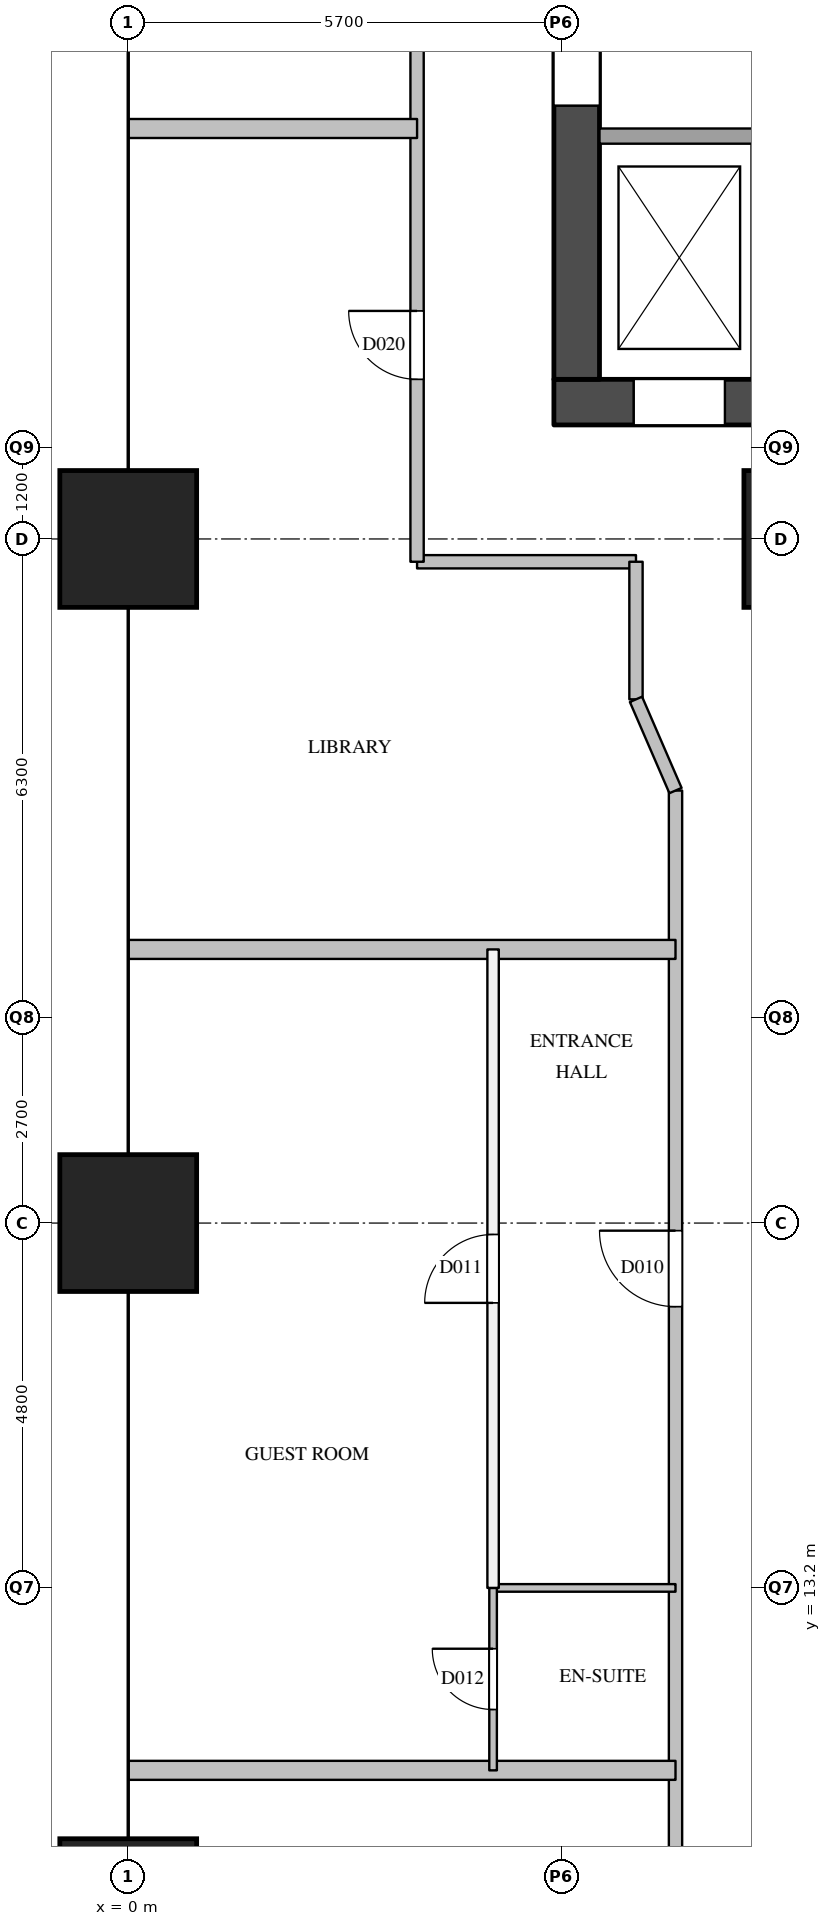
"""IFC4 building model, lengths in metres.
Left out: names, types, materials, properties, quantities, classifications, styles, units other than length and angle.
Written with IfcOpenShell. Run it as: python <this file> out.ifc"""

import sys

from ifc_helpers import new_model, si_unit, direction, frame, frame_2d, origin, origin_2d, place, context, subcontext, project, spatial, rectangle, extrude, element, fill, save


model = new_model("IFC4")
c1 = context("Model", 3, precision=1e-05, world=origin(), true_north=direction((0.0, 1.0)))
c2 = subcontext(c1, "Body", "Model", "MODEL_VIEW")
j1 = project(units=[si_unit("LENGTHUNIT", "METRE"), si_unit("PLANEANGLEUNIT", "RADIAN")], contexts=[c1])
p1 = place(None, origin())
s1 = spatial("IfcSite", under=j1, at=p1, CompositionType="ELEMENT")
p2 = place(p1, origin())
s2 = spatial("IfcBuilding", under=s1, at=p2, CompositionType="ELEMENT")
p3 = place(p2, frame((0.0, 0.0, 31.0)))
s3 = spatial("IfcBuildingStorey", under=s2, at=p3, CompositionType="ELEMENT", Elevation=31.0)
for number, where, z_axis, x_axis in (
    (1, (0.0, 9.0, 0.0), (0.0, 0.0, 1.0), (1.0, 0.0, 0.0)),
    (2, (0.0, 18.0, 0.0), (0.0, 0.0, 1.0), (1.0, 0.0, 0.0)),
    (3, (0.0, 27.0, 0.0), (0.0, 0.0, 1.0), (1.0, 0.0, 0.0)),
    (4, (9.0, 27.0, 0.0), (0.0, 0.0, 1.0), (1.0, 0.0, 0.0)),
):
    element("IfcColumn", number, at=place(p3, frame(where, z_axis=z_axis, x_axis=x_axis)), inside=s3, PredefinedType="COLUMN", context=c2, shape_type="SweptSolid", body=[
        extrude(rectangle(XDim=1.8, YDim=1.8, at=origin_2d()), origin(), (0.0, 0.0, 1.0), 3.8),
    ])
p4 = place(p3, frame((5.6, 28.8, 0.0), z_axis=(0.0, 0.0, 1.0), x_axis=(1.0, 0.0, 0.0)))
e5 = element("IfcWall", 5, at=p4, inside=s3, PredefinedType="SHEAR", context=c2, shape_type="SweptSolid", body=[
    extrude(rectangle(XDim=12.4, YDim=0.6, at=frame_2d((6.2, 0.0))), origin(), (0.0, 0.0, 1.0), 3.5),
])
p5 = place(p4, frame((1.05, 0.0, 0.0)))
e6 = element("IfcOpeningElement", 6, at=p5, cuts=e5, PredefinedType="OPENING", context=c2, shape_type="SweptSolid", body=[
    extrude(rectangle(XDim=1.2, YDim=2.1, at=frame_2d((0.6, 1.05))), frame((0.0, 0.31, 0.0), z_axis=(0.0, -1.0, 0.0), x_axis=(1.0, 0.0, 0.0)), (0.0, 0.0, 1.0), 0.62),
])
p6 = place(p4, frame((5.25, 0.0, 0.0)))
e7 = element("IfcOpeningElement", 7, at=p6, cuts=e5, PredefinedType="OPENING", context=c2, shape_type="SweptSolid", body=[
    extrude(rectangle(XDim=1.2, YDim=2.1, at=frame_2d((0.6, 1.05))), frame((0.0, 0.31, 0.0), z_axis=(0.0, -1.0, 0.0), x_axis=(1.0, 0.0, 0.0)), (0.0, 0.0, 1.0), 0.62),
])
p7 = place(p4, frame((7.35, 0.0, 0.0)))
e8 = element("IfcOpeningElement", 8, at=p7, cuts=e5, PredefinedType="OPENING", context=c2, shape_type="SweptSolid", body=[
    extrude(rectangle(XDim=1.2, YDim=2.1, at=frame_2d((0.6, 1.05))), frame((0.0, 0.31, 0.0), z_axis=(0.0, -1.0, 0.0), x_axis=(1.0, 0.0, 0.0)), (0.0, 0.0, 1.0), 0.62),
])
p8 = place(p3, frame((5.9, 29.1, 0.0), z_axis=(0.0, 0.0, 1.0), x_axis=(0.0, 1.0, 0.0)))
e9 = element("IfcWall", 9, at=p8, inside=s3, PredefinedType="SHEAR", context=c2, shape_type="SweptSolid", body=[
    extrude(rectangle(XDim=20.3, YDim=0.6, at=frame_2d((10.15, 0.0))), origin(), (0.0, 0.0, 1.0), 3.5),
])
p9 = place(p8, frame((3.6, 0.0, 0.0)))
e10 = element("IfcOpeningElement", 10, at=p9, cuts=e9, PredefinedType="OPENING", context=c2, shape_type="SweptSolid", body=[
    extrude(rectangle(XDim=1.8, YDim=2.1, at=frame_2d((0.9, 1.05))), frame((0.0, 0.31, 0.0), z_axis=(0.0, -1.0, 0.0), x_axis=(1.0, 0.0, 0.0)), (0.0, 0.0, 1.0), 0.62),
])
p10 = place(p8, frame((16.4, 0.0, 0.0)))
e11 = element("IfcOpeningElement", 11, at=p10, cuts=e9, PredefinedType="OPENING", context=c2, shape_type="SweptSolid", body=[
    extrude(rectangle(XDim=1.0, YDim=2.1, at=frame_2d((0.5, 1.05))), frame((0.0, 0.31, 0.0), z_axis=(0.0, -1.0, 0.0), x_axis=(1.0, 0.0, 0.0)), (0.0, 0.0, 1.0), 0.62),
])
p11 = place(p3, frame((6.2, 32.3, 0.0), z_axis=(0.0, 0.0, 1.0), x_axis=(1.0, 0.0, 0.0)))
e12 = element("IfcWall", 12, at=p11, inside=s3, PredefinedType="SOLIDWALL", context=c2, shape_type="SweptSolid", body=[
    extrude(rectangle(XDim=11.2, YDim=0.2, at=frame_2d((5.6, 0.0))), origin(), (0.0, 0.0, 1.0), 3.5),
])
p12 = place(p11, frame((2.55, 0.0, 0.0)))
e13 = element("IfcOpeningElement", 13, at=p12, cuts=e12, PredefinedType="OPENING", context=c2, shape_type="SweptSolid", body=[
    extrude(rectangle(XDim=1.2, YDim=2.1, at=frame_2d((0.6, 1.05))), frame((0.0, 0.11, 0.0), z_axis=(0.0, -1.0, 0.0), x_axis=(1.0, 0.0, 0.0)), (0.0, 0.0, 1.0), 0.22),
])
p13 = place(p3, frame((3.8, 26.7, 0.0), z_axis=(0.0, 0.0, 1.0), x_axis=(1.0, 0.0, 0.0)))
e14 = element("IfcWall", 14, at=p13, inside=s3, PredefinedType="PARTITIONING", context=c2, shape_type="SweptSolid", body=[
    extrude(rectangle(XDim=2.88, YDim=0.175, at=frame_2d((1.44, 0.0))), origin(), (0.0, 0.0, 1.0), 2.5),
])
p14 = place(p3, frame((3.8, 26.7, 0.0), z_axis=(0.0, 0.0, 1.0), x_axis=(0.0, 1.0, 0.0)))
e15 = element("IfcWall", 15, at=p14, inside=s3, PredefinedType="PARTITIONING", context=c2, shape_type="SweptSolid", body=[
    extrude(rectangle(XDim=25.1, YDim=0.175, at=frame_2d((12.55, 0.0))), origin(), (0.0, 0.0, 1.0), 2.5),
])
p15 = place(p14, frame((2.4, 0.0, 0.0)))
e16 = element("IfcOpeningElement", 16, at=p15, cuts=e15, PredefinedType="OPENING", context=c2, shape_type="SweptSolid", body=[
    extrude(rectangle(XDim=0.9, YDim=2.1, at=frame_2d((0.45, 1.05))), frame((0.0, 0.097, 0.0), z_axis=(0.0, -1.0, 0.0), x_axis=(1.0, 0.0, 0.0)), (0.0, 0.0, 1.0), 0.195),
])
p16 = place(p14, frame((7.95, 0.0, 0.0)))
e17 = element("IfcOpeningElement", 17, at=p16, cuts=e15, PredefinedType="OPENING", context=c2, shape_type="SweptSolid", body=[
    extrude(rectangle(XDim=0.9, YDim=2.1, at=frame_2d((0.45, 1.05))), frame((0.0, 0.097, 0.0), z_axis=(0.0, -1.0, 0.0), x_axis=(1.0, 0.0, 0.0)), (0.0, 0.0, 1.0), 0.195),
])
p17 = place(p14, frame((13.35, 0.0, 0.0)))
e18 = element("IfcOpeningElement", 18, at=p17, cuts=e15, PredefinedType="OPENING", context=c2, shape_type="SweptSolid", body=[
    extrude(rectangle(XDim=0.9, YDim=2.1, at=frame_2d((0.45, 1.05))), frame((0.0, 0.097, 0.0), z_axis=(0.0, -1.0, 0.0), x_axis=(1.0, 0.0, 0.0)), (0.0, 0.0, 1.0), 0.195),
])
p18 = place(p14, frame((20.35, 0.0, 0.0)))
e19 = element("IfcOpeningElement", 19, at=p18, cuts=e15, PredefinedType="OPENING", context=c2, shape_type="SweptSolid", body=[
    extrude(rectangle(XDim=0.9, YDim=2.1, at=frame_2d((0.45, 1.05))), frame((0.0, 0.097, 0.0), z_axis=(0.0, -1.0, 0.0), x_axis=(1.0, 0.0, 0.0)), (0.0, 0.0, 1.0), 0.195),
])
p19 = place(p3, frame((6.68, 24.89, 0.0), z_axis=(0.0, 0.0, 1.0), x_axis=(0.0, 1.0, 0.0)))
e20 = element("IfcWall", 20, at=p19, inside=s3, PredefinedType="PARTITIONING", context=c2, shape_type="SweptSolid", body=[
    extrude(rectangle(XDim=1.81, YDim=0.175, at=frame_2d((0.905, 0.0))), origin(), (0.0, 0.0, 1.0), 2.5),
])
p20 = place(p3, frame((7.2, 7.2, 0.0), z_axis=(0.0, 0.0, 1.0), x_axis=(0.0, 1.0, 0.0)))
e21 = element("IfcWall", 21, at=p20, inside=s3, PredefinedType="PARTITIONING", context=c2, shape_type="SweptSolid", body=[
    extrude(rectangle(XDim=16.49, YDim=0.175, at=frame_2d((8.245, 0.0))), origin(), (0.0, 0.0, 1.0), 3.5),
])
p21 = place(p20, frame((9.7, 0.0, 0.0)))
e22 = element("IfcOpeningElement", 22, at=p21, cuts=e21, PredefinedType="OPENING", context=c2, shape_type="SweptSolid", body=[
    extrude(rectangle(XDim=1.0, YDim=2.1, at=frame_2d((0.5, 1.05))), frame((0.0, 0.097, 0.0), z_axis=(0.0, -1.0, 0.0), x_axis=(1.0, 0.0, 0.0)), (0.0, 0.0, 1.0), 0.195),
])
p22 = place(p3, frame((4.8, 13.2, 0.0), z_axis=(0.0, 0.0, 1.0), x_axis=(0.0, 1.0, 0.0)))
e23 = element("IfcWall", 23, at=p22, inside=s3, PredefinedType="PARTITIONING", context=c2, shape_type="SweptSolid", body=[
    extrude(rectangle(XDim=8.4, YDim=0.15, at=frame_2d((4.2, 0.0))), origin(), (0.0, 0.0, 1.0), 3.5),
])
p23 = place(p22, frame((3.75, 0.0, 0.0)))
e24 = element("IfcOpeningElement", 24, at=p23, cuts=e23, PredefinedType="OPENING", context=c2, shape_type="SweptSolid", body=[
    extrude(rectangle(XDim=0.9, YDim=2.1, at=frame_2d((0.45, 1.05))), frame((0.0, 0.085, 0.0), z_axis=(0.0, -1.0, 0.0), x_axis=(1.0, 0.0, 0.0)), (0.0, 0.0, 1.0), 0.17),
])
for number, where, z_axis, x_axis in (
    (25, (0.0, 10.8, 0.0), (0.0, 0.0, 1.0), (1.0, 0.0, 0.0)),
    (26, (0.0, 21.6, 0.0), (0.0, 0.0, 1.0), (1.0, 0.0, 0.0)),
):
    element("IfcWall", number, at=place(p3, frame(where, z_axis=z_axis, x_axis=x_axis)), inside=s3, PredefinedType="PARTITIONING", context=c2, shape_type="SweptSolid", body=[
        extrude(rectangle(XDim=7.2, YDim=0.25, at=frame_2d((3.6, 0.0))), origin(), (0.0, 0.0, 1.0), 2.5),
    ])
p24 = place(p3, frame((0.0, 32.4, 0.0), z_axis=(0.0, 0.0, 1.0), x_axis=(1.0, 0.0, 0.0)))
e27 = element("IfcWall", 27, at=p24, inside=s3, PredefinedType="PARTITIONING", context=c2, shape_type="SweptSolid", body=[
    extrude(rectangle(XDim=3.8, YDim=0.25, at=frame_2d((1.9, 0.0))), origin(), (0.0, 0.0, 1.0), 2.5),
])
p25 = place(p3, frame((4.8, 13.2, 0.0), z_axis=(0.0, 0.0, 1.0), x_axis=(1.0, 0.0, 0.0)))
e28 = element("IfcWall", 28, at=p25, inside=s3, PredefinedType="PARTITIONING", context=c2, shape_type="SweptSolid", body=[
    extrude(rectangle(XDim=2.4, YDim=0.1, at=frame_2d((1.2, 0.0))), origin(), (0.0, 0.0, 1.0), 3.5),
])
p26 = place(p3, frame((4.8, 10.8, 0.0), z_axis=(0.0, 0.0, 1.0), x_axis=(0.0, 1.0, 0.0)))
e29 = element("IfcWall", 29, at=p26, inside=s3, PredefinedType="PARTITIONING", context=c2, shape_type="SweptSolid", body=[
    extrude(rectangle(XDim=2.4, YDim=0.1, at=frame_2d((1.2, 0.0))), origin(), (0.0, 0.0, 1.0), 3.5),
])
p27 = place(p26, frame((0.8, 0.0, 0.0)))
e30 = element("IfcOpeningElement", 30, at=p27, cuts=e29, PredefinedType="OPENING", context=c2, shape_type="SweptSolid", body=[
    extrude(rectangle(XDim=0.8, YDim=2.1, at=frame_2d((0.4, 1.05))), frame((0.0, 0.06, 0.0), z_axis=(0.0, -1.0, 0.0), x_axis=(1.0, 0.0, 0.0)), (0.0, 0.0, 1.0), 0.12),
])
p28 = place(p3, frame((7.2, 23.69, 0.0), z_axis=(0.0, 0.0, 1.0), x_axis=(-0.397633632391, 0.917544273804, 0.0)))
e31 = element("IfcWall", 31, at=p28, inside=s3, PredefinedType="PARTITIONING", context=c2, shape_type="SweptSolid", body=[
    extrude(rectangle(XDim=1.308, YDim=0.175, at=frame_2d((0.654, 0.0))), origin(), (0.0, 0.0, 1.0), 3.5),
])
p29 = place(p5, origin())
e32 = element("IfcDoor", 32, at=p29, inside=s3, OperationType="SLIDING_TO_LEFT", PredefinedType="DOOR", context=c2, shape_type="SweptSolid", body=[
    extrude(rectangle(XDim=1.2, YDim=2.1, at=frame_2d((0.6, 1.05))), frame((0.0, 0.025, 0.0), z_axis=(0.0, -1.0, 0.0), x_axis=(1.0, 0.0, 0.0)), (0.0, 0.0, 1.0), 0.05),
])
fill(e6, e32)
p30 = place(p9, origin())
e33 = element("IfcDoor", 33, at=p30, inside=s3, OperationType="DOUBLE_DOOR_SINGLE_SWING", PredefinedType="DOOR", context=c2, shape_type="SweptSolid", body=[
    extrude(rectangle(XDim=1.8, YDim=2.1, at=frame_2d((0.9, 1.05))), frame((0.0, 0.025, 0.0), z_axis=(0.0, -1.0, 0.0), x_axis=(1.0, 0.0, 0.0)), (0.0, 0.0, 1.0), 0.05),
])
fill(e10, e33)
p31 = place(p21, origin())
e34 = element("IfcDoor", 34, at=p31, inside=s3, OperationType="SINGLE_SWING_RIGHT", PredefinedType="DOOR", context=c2, shape_type="SweptSolid", body=[
    extrude(rectangle(XDim=1.0, YDim=2.1, at=frame_2d((0.5, 1.05))), frame((0.0, 0.025, 0.0), z_axis=(0.0, -1.0, 0.0), x_axis=(1.0, 0.0, 0.0)), (0.0, 0.0, 1.0), 0.05),
])
fill(e22, e34)
p32 = place(p23, origin())
e35 = element("IfcDoor", 35, at=p32, inside=s3, OperationType="SINGLE_SWING_LEFT", PredefinedType="DOOR", context=c2, shape_type="SweptSolid", body=[
    extrude(rectangle(XDim=0.9, YDim=2.1, at=frame_2d((0.45, 1.05))), frame((0.0, 0.025, 0.0), z_axis=(0.0, -1.0, 0.0), x_axis=(1.0, 0.0, 0.0)), (0.0, 0.0, 1.0), 0.05),
])
fill(e24, e35)
p33 = place(p27, origin())
e36 = element("IfcDoor", 36, at=p33, inside=s3, OperationType="SINGLE_SWING_RIGHT", PredefinedType="DOOR", context=c2, shape_type="SweptSolid", body=[
    extrude(rectangle(XDim=0.8, YDim=2.1, at=frame_2d((0.4, 1.05))), frame((0.0, 0.025, 0.0), z_axis=(0.0, -1.0, 0.0), x_axis=(1.0, 0.0, 0.0)), (0.0, 0.0, 1.0), 0.05),
])
fill(e30, e36)
p34 = place(p15, origin())
e37 = element("IfcDoor", 37, at=p34, inside=s3, OperationType="SINGLE_SWING_RIGHT", PredefinedType="DOOR", context=c2, shape_type="SweptSolid", body=[
    extrude(rectangle(XDim=0.9, YDim=2.1, at=frame_2d((0.45, 1.05))), frame((0.0, 0.025, 0.0), z_axis=(0.0, -1.0, 0.0), x_axis=(1.0, 0.0, 0.0)), (0.0, 0.0, 1.0), 0.05),
])
fill(e16, e37)
save(model, sys.argv[1])
